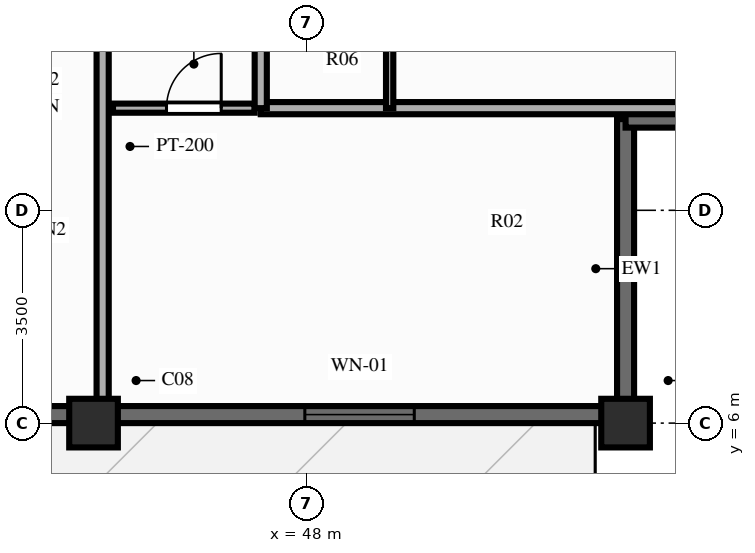
"""IFC4 building model, lengths in metres.
Left out: names, types, materials, properties, quantities, classifications, styles, units other than length and angle.
Written with IfcOpenShell. Run it as: python <this file> out.ifc"""

import sys

from ifc_helpers import new_model, si_unit, direction, frame, frame_2d, origin, origin_2d, place, context, subcontext, project, spatial, rectangle, extrude, source, transform, mapped, element, fill, save


model = new_model("IFC4")
c1 = context("Model", 3, precision=1e-05, world=origin(), true_north=direction((0.0, 1.0)))
c2 = subcontext(c1, "Body", "Model", "MODEL_VIEW")
j1 = project(units=[si_unit("LENGTHUNIT", "METRE"), si_unit("PLANEANGLEUNIT", "RADIAN")], contexts=[c1])
p1 = place(None, origin())
s1 = spatial("IfcSite", under=j1, at=p1, CompositionType="ELEMENT")
p2 = place(p1, origin())
s2 = spatial("IfcBuilding", under=s1, at=p2, CompositionType="ELEMENT")
p3 = place(p2, frame((0.0, 0.0, 172.9)))
s3 = spatial("IfcBuildingStorey", under=s2, at=p3, CompositionType="ELEMENT", Elevation=172.9)
m1 = source(origin(), c2, "Body", "SweptSolid", [
    extrude(rectangle(XDim=0.8, YDim=0.8, at=origin_2d()), origin(), (0.0, 0.0, 1.0), 3.9),
])
for number, where, z_axis, x_axis in (
    (1, (44.5, 6.0, 0.0), (0.0, 0.0, 1.0), (1.0, 0.0, 0.0)),
    (2, (53.25, 6.0, 0.0), (0.0, 0.0, 1.0), (1.0, 0.0, 0.0)),
):
    element("IfcColumn", number, at=place(p3, frame(where, z_axis=z_axis, x_axis=x_axis)), inside=s3, PredefinedType="COLUMN", context=c2, shape_type="MappedRepresentation", body=[
        mapped(m1, transform((0.0, 0.0, 0.0), scale=1.0)),
    ])
p4 = place(p3, frame((22.75, 6.14, 0.0), z_axis=(0.0, 0.0, 1.0), x_axis=(1.0, 0.0, 0.0)))
e3 = element("IfcWall", 3, at=p4, inside=s3, PredefinedType="SOLIDWALL", context=c2, shape_type="SweptSolid", body=[
    extrude(rectangle(XDim=30.5, YDim=0.28, at=frame_2d((15.25, 0.0))), origin(), (0.0, 0.0, 1.0), 2.79),
])
p5 = place(p4, frame((4.925, 0.0, 0.0), z_axis=(0.0, 0.0, 1.0), x_axis=(-1.0, 0.0, 0.0)))
e4 = element("IfcOpeningElement", 4, at=p5, cuts=e3, PredefinedType="OPENING", context=c2, shape_type="SweptSolid", body=[
    extrude(rectangle(XDim=1.1, YDim=2.15, at=frame_2d((0.55, 1.075))), frame((0.0, 0.152, 0.0), z_axis=(0.0, -1.0, 0.0), x_axis=(1.0, 0.0, 0.0)), (0.0, 0.0, 1.0), 0.304),
])
p6 = place(p4, frame((9.47, 0.0, 0.85)))
e5 = element("IfcOpeningElement", 5, at=p6, cuts=e3, PredefinedType="OPENING", context=c2, shape_type="SweptSolid", body=[
    extrude(rectangle(XDim=1.5, YDim=1.65, at=frame_2d((0.75, 0.825))), frame((0.0, 0.152, 0.0), z_axis=(0.0, -1.0, 0.0), x_axis=(1.0, 0.0, 0.0)), (0.0, 0.0, 1.0), 0.304),
])
p7 = place(p4, frame((12.45, 0.0, 0.85)))
e6 = element("IfcOpeningElement", 6, at=p7, cuts=e3, PredefinedType="OPENING", context=c2, shape_type="SweptSolid", body=[
    extrude(rectangle(XDim=1.8, YDim=1.65, at=frame_2d((0.9, 0.825))), frame((0.0, 0.152, 0.0), z_axis=(0.0, -1.0, 0.0), x_axis=(1.0, 0.0, 0.0)), (0.0, 0.0, 1.0), 0.304),
])
p8 = place(p4, frame((16.25, 0.0, 0.85)))
e7 = element("IfcOpeningElement", 7, at=p8, cuts=e3, PredefinedType="OPENING", context=c2, shape_type="SweptSolid", body=[
    extrude(rectangle(XDim=1.8, YDim=1.65, at=frame_2d((0.9, 0.825))), frame((0.0, 0.152, 0.0), z_axis=(0.0, -1.0, 0.0), x_axis=(1.0, 0.0, 0.0)), (0.0, 0.0, 1.0), 0.304),
])
p9 = place(p4, frame((19.53, 0.0, 0.85)))
e8 = element("IfcOpeningElement", 8, at=p9, cuts=e3, PredefinedType="OPENING", context=c2, shape_type="SweptSolid", body=[
    extrude(rectangle(XDim=1.5, YDim=1.65, at=frame_2d((0.75, 0.825))), frame((0.0, 0.152, 0.0), z_axis=(0.0, -1.0, 0.0), x_axis=(1.0, 0.0, 0.0)), (0.0, 0.0, 1.0), 0.304),
])
p10 = place(p4, frame((25.225, 0.0, 0.85)))
e9 = element("IfcOpeningElement", 9, at=p10, cuts=e3, PredefinedType="OPENING", context=c2, shape_type="SweptSolid", body=[
    extrude(rectangle(XDim=1.8, YDim=1.65, at=frame_2d((0.9, 0.825))), frame((0.0, 0.152, 0.0), z_axis=(0.0, -1.0, 0.0), x_axis=(1.0, 0.0, 0.0)), (0.0, 0.0, 1.0), 0.304),
])
for number, where, z_axis, x_axis in (
    (10, (53.25, 6.08, 0.0), (0.0, 0.0, 1.0), (0.0, 1.0, 0.0)),
    (11, (53.25, 11.0, 0.0), (0.0, 0.0, 1.0), (1.0, 0.0, 0.0)),
):
    element("IfcWall", number, at=place(p3, frame(where, z_axis=z_axis, x_axis=x_axis)), inside=s3, PredefinedType="SOLIDWALL", context=c2, shape_type="SweptSolid", body=[
        extrude(rectangle(XDim=4.92, YDim=0.28, at=frame_2d((2.46, 0.0))), origin(), (0.0, 0.0, 1.0), 2.79),
    ])
p11 = place(p3, frame((44.82, 11.18, 0.0), z_axis=(0.0, 0.0, 1.0), x_axis=(1.0, 0.0, 0.0)))
e12 = element("IfcWall", 12, at=p11, inside=s3, PredefinedType="PARTITIONING", context=c2, shape_type="SweptSolid", body=[
    extrude(rectangle(XDim=2.33, YDim=0.15, at=frame_2d((1.165, 0.0))), origin(), (0.0, 0.0, 1.0), 3.69),
])
p12 = place(p11, frame((0.88, 0.0, 0.0)))
e13 = element("IfcOpeningElement", 13, at=p12, cuts=e12, PredefinedType="OPENING", context=c2, shape_type="SweptSolid", body=[
    extrude(rectangle(XDim=0.9, YDim=2.1, at=frame_2d((0.45, 1.05))), frame((0.0, 0.087, 0.0), z_axis=(0.0, -1.0, 0.0), x_axis=(1.0, 0.0, 0.0)), (0.0, 0.0, 1.0), 0.174),
])
p13 = place(p3, frame((44.65, 14.95, 0.0), z_axis=(0.0, 0.0, 1.0), x_axis=(0.0, -1.0, 0.0)))
e14 = element("IfcWall", 14, at=p13, inside=s3, PredefinedType="PARTITIONING", context=c2, shape_type="SweptSolid", body=[
    extrude(rectangle(XDim=8.8, YDim=0.2, at=frame_2d((4.4, 0.0))), origin(), (0.0, 0.0, 1.0), 2.79),
])
p14 = place(p3, frame((47.25, 11.18, 0.0), z_axis=(0.0, 0.0, 1.0), x_axis=(1.0, 0.0, 0.0)))
e15 = element("IfcWall", 15, at=p14, inside=s3, PredefinedType="PARTITIONING", context=c2, shape_type="SweptSolid", body=[
    extrude(rectangle(XDim=10.85, YDim=0.2, at=frame_2d((5.425, 0.0))), origin(), (0.0, 0.0, 1.0), 3.69),
])
p15 = place(p3, frame((47.25, 11.18, 0.0), z_axis=(0.0, 0.0, 1.0), x_axis=(0.0, 1.0, 0.0)))
e16 = element("IfcWall", 16, at=p15, inside=s3, PredefinedType="PARTITIONING", context=c2, shape_type="SweptSolid", body=[
    extrude(rectangle(XDim=2.75, YDim=0.2, at=frame_2d((1.375, 0.0))), origin(), (0.0, 0.0, 1.0), 3.69),
])
p16 = place(p3, frame((49.37, 11.18, 0.0), z_axis=(0.0, 0.0, 1.0), x_axis=(0.0, 1.0, 0.0)))
e17 = element("IfcWall", 17, at=p16, inside=s3, PredefinedType="PARTITIONING", context=c2, shape_type="SweptSolid", body=[
    extrude(rectangle(XDim=2.75, YDim=0.12, at=frame_2d((1.375, 0.0))), origin(), (0.0, 0.0, 1.0), 3.69),
])
m2 = source(origin(), c2, "Body", "SweptSolid", [
    extrude(rectangle(XDim=1.8, YDim=1.65, at=frame_2d((0.9, 0.825))), frame((0.0, 0.03, 0.0), z_axis=(0.0, -1.0, 0.0), x_axis=(1.0, 0.0, 0.0)), (0.0, 0.0, 1.0), 0.06),
])
p17 = place(p10, origin())
e18 = element("IfcWindow", 18, at=p17, inside=s3, PartitioningType="SINGLE_PANEL", PredefinedType="WINDOW", context=c2, shape_type="MappedRepresentation", body=[
    mapped(m2, transform((0.0, 0.0, 0.0), scale=1.0)),
])
fill(e9, e18)
m3 = source(origin(), c2, "Body", "SweptSolid", [
    extrude(rectangle(XDim=0.9, YDim=2.1, at=frame_2d((0.45, 1.05))), frame((0.0, 0.025, 0.0), z_axis=(0.0, -1.0, 0.0), x_axis=(1.0, 0.0, 0.0)), (0.0, 0.0, 1.0), 0.05),
])
p18 = place(p12, origin())
e19 = element("IfcDoor", 19, at=p18, inside=s3, OperationType="SINGLE_SWING_RIGHT", PredefinedType="DOOR", context=c2, shape_type="MappedRepresentation", body=[
    mapped(m3, transform((0.0, 0.0, 0.0), scale=1.0)),
])
fill(e13, e19)
save(model, sys.argv[1])
